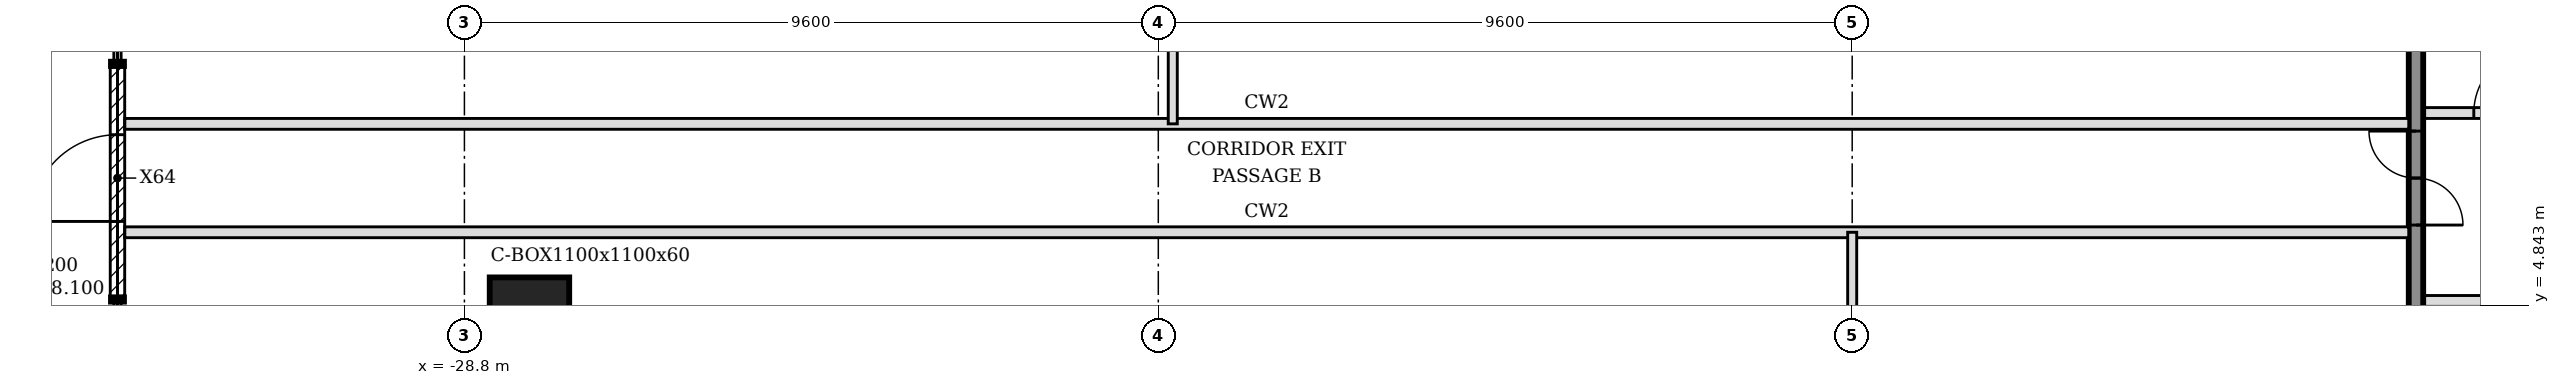
"""IFC4 building model, lengths in metres.
Left out: names, types, materials, properties, quantities, classifications, styles, units other than length and angle.
Written with IfcOpenShell. Run it as: python <this file> out.ifc"""

import sys

from ifc_helpers import new_model, si_unit, direction, frame, frame_2d, origin, origin_2d, place, context, subcontext, project, spatial, polyline, rectangle, hollow_rectangle, outline, extrude, element, fill, save


model = new_model("IFC4")
c1 = context("Model", 3, precision=1e-05, world=origin(), true_north=direction((0.0, 1.0)))
c2 = subcontext(c1, "Body", "Model", "MODEL_VIEW")
j1 = project(units=[si_unit("LENGTHUNIT", "METRE"), si_unit("PLANEANGLEUNIT", "RADIAN")], contexts=[c1])
p1 = place(None, origin())
s1 = spatial("IfcSite", under=j1, at=p1, CompositionType="ELEMENT")
p2 = place(p1, origin())
s2 = spatial("IfcBuilding", under=s1, at=p2, CompositionType="ELEMENT")
p3 = place(p2, origin())
s3 = spatial("IfcBuildingStorey", under=s2, at=p3, CompositionType="ELEMENT", Elevation=0.0)
p4 = place(p3, frame((-27.9, 4.676, -0.25), z_axis=(0.0, 0.0, 1.0), x_axis=(1.0, 0.0, 0.0)))
e1 = element("IfcColumn", 1, at=p4, inside=s3, PredefinedType="COLUMN", context=c2, shape_type="SweptSolid", body=[
    extrude(hollow_rectangle(XDim=1.1, YDim=1.1, WallThickness=0.06, at=origin_2d()), origin(), (0.0, 0.0, 1.0), 9.05),
])
p5 = place(p3, frame((-33.6, 4.95, 0.0), z_axis=(0.0, 0.0, 1.0), x_axis=(0.0, 1.0, 0.0)))
e2 = element("IfcWall", 2, at=p5, inside=s3, PredefinedType="SOLIDWALL", context=c2, shape_type="SweptSolid", body=[
    extrude(rectangle(XDim=3.2, YDim=0.2, at=frame_2d((1.6, 0.0))), origin(), (0.0, 0.0, 1.0), 8.1),
])
p6 = place(p5, frame((1.05, 0.0, 0.0)))
e3 = element("IfcOpeningElement", 3, at=p6, cuts=e2, PredefinedType="OPENING", context=c2, shape_type="SweptSolid", body=[
    extrude(rectangle(XDim=1.2, YDim=2.1, at=frame_2d((0.6, 1.05))), frame((0.0, 0.11, 0.0), z_axis=(0.0, -1.0, 0.0), x_axis=(1.0, 0.0, 0.0)), (0.0, 0.0, 1.0), 0.22),
])
p7 = place(p3, frame((-1.7, 4.9, 0.0), z_axis=(0.0, 0.0, 1.0), x_axis=(1.0, 0.0, 0.0)))
e4 = element("IfcWall", 4, at=p7, inside=s3, PredefinedType="SOLIDWALL", context=c2, shape_type="SweptSolid", body=[
    extrude(rectangle(XDim=4.9, YDim=0.15, at=frame_2d((2.45, 0.0))), origin(), (0.0, 0.0, 1.0), 8.8),
])
p8 = place(p7, frame((1.95, 0.0, 0.0)))
e5 = element("IfcOpeningElement", 5, at=p8, cuts=e4, PredefinedType="OPENING", context=c2, shape_type="SweptSolid", body=[
    extrude(rectangle(XDim=0.9, YDim=2.1, at=frame_2d((0.45, 1.05))), frame((0.0, 0.085, 0.0), z_axis=(0.0, -1.0, 0.0), x_axis=(1.0, 0.0, 0.0)), (0.0, 0.0, 1.0), 0.17),
])
p9 = place(p3, frame((-1.7, 7.5, 0.0), z_axis=(0.0, 0.0, 1.0), x_axis=(1.0, 0.0, 0.0)))
e6 = element("IfcWall", 6, at=p9, inside=s3, PredefinedType="SOLIDWALL", context=c2, shape_type="SweptSolid", body=[
    extrude(rectangle(XDim=4.825, YDim=0.15, at=frame_2d((2.413, 0.0))), origin(), (0.0, 0.0, 1.0), 8.8),
])
p10 = place(p9, frame((0.7, 0.0, 0.0)))
e7 = element("IfcOpeningElement", 7, at=p10, cuts=e6, PredefinedType="OPENING", context=c2, shape_type="SweptSolid", body=[
    extrude(rectangle(XDim=0.9, YDim=2.1, at=frame_2d((0.45, 1.05))), frame((0.0, 0.085, 0.0), z_axis=(0.0, -1.0, 0.0), x_axis=(1.0, 0.0, 0.0)), (0.0, 0.0, 1.0), 0.17),
])
p11 = place(p9, frame((3.2, 0.0, 0.0)))
e8 = element("IfcOpeningElement", 8, at=p11, cuts=e6, PredefinedType="OPENING", context=c2, shape_type="SweptSolid", body=[
    extrude(rectangle(XDim=0.9, YDim=2.1, at=frame_2d((0.45, 1.05))), frame((0.0, 0.085, 0.0), z_axis=(0.0, -1.0, 0.0), x_axis=(1.0, 0.0, 0.0)), (0.0, 0.0, 1.0), 0.17),
])
p12 = place(p3, frame((-1.8, -5.5, 0.0), z_axis=(0.0, 0.0, 1.0), x_axis=(0.0, 1.0, 0.0)))
e9 = element("IfcWall", 9, at=p12, inside=s3, PredefinedType="SOLIDWALL", context=c2, shape_type="SweptSolid", body=[
    extrude(rectangle(XDim=15.8, YDim=0.2, at=frame_2d((7.9, 0.0))), origin(), (0.0, 0.0, 1.0), 8.8),
])
p13 = place(p12, frame((3.05, 0.0, 0.0)))
e10 = element("IfcOpeningElement", 10, at=p13, cuts=e9, PredefinedType="OPENING", context=c2, shape_type="SweptSolid", body=[
    extrude(rectangle(XDim=1.3, YDim=2.1, at=frame_2d((0.65, 1.05))), frame((0.0, 0.11, 0.0), z_axis=(0.0, -1.0, 0.0), x_axis=(1.0, 0.0, 0.0)), (0.0, 0.0, 1.0), 0.22),
])
p14 = place(p12, frame((11.45, 0.0, 0.0)))
e11 = element("IfcOpeningElement", 11, at=p14, cuts=e9, PredefinedType="OPENING", context=c2, shape_type="SweptSolid", body=[
    extrude(rectangle(XDim=1.3, YDim=2.1, at=frame_2d((0.65, 1.05))), frame((0.0, 0.11, 0.0), z_axis=(0.0, -1.0, 0.0), x_axis=(1.0, 0.0, 0.0)), (0.0, 0.0, 1.0), 0.22),
])
for number, where, z_axis, x_axis in (
    (12, (-33.5, 5.85, 0.0), (0.0, 0.0, 1.0), (1.0, 0.0, 0.0)),
    (13, (-33.5, 7.35, 0.0), (0.0, 0.0, 1.0), (1.0, 0.0, 0.0)),
):
    element("IfcWall", number, at=place(p3, frame(where, z_axis=z_axis, x_axis=x_axis)), inside=s3, PredefinedType="SOLIDWALL", context=c2, shape_type="SweptSolid", body=[
        extrude(rectangle(XDim=31.6, YDim=0.15, at=frame_2d((15.8, 0.0))), origin(), (0.0, 0.0, 1.0), 8.8),
    ])
p15 = place(p3, frame((-9.6, -8.938, 0.0), z_axis=(0.0, 0.0, 1.0), x_axis=(0.0, 1.0, 0.0)))
e14 = element("IfcWall", 14, at=p15, inside=s3, PredefinedType="PARTITIONING", context=c2, shape_type="SweptSolid", body=[
    extrude(outline(polyline([(0.0, 0.0), (14.788, 0.0), (14.788, 8.28), (9.087, 8.28), (9.085, 8.18), (8.788, 8.18), (8.785, 8.28), (0.0, 8.28), (0.0, 0.0)])), frame((0.0, 0.062, 0.0), z_axis=(0.0, -1.0, 0.0), x_axis=(1.0, 0.0, 0.0)), (0.0, 0.0, 1.0), 0.125),
])
p16 = place(p15, frame((5.538, 0.0, 0.0)))
e15 = element("IfcOpeningElement", 15, at=p16, cuts=e14, PredefinedType="OPENING", context=c2, shape_type="SweptSolid", body=[
    extrude(rectangle(XDim=1.8, YDim=2.1, at=frame_2d((0.9, 1.05))), frame((0.0, 0.073, 0.0), z_axis=(0.0, -1.0, 0.0), x_axis=(1.0, 0.0, 0.0)), (0.0, 0.0, 1.0), 0.145),
])
p17 = place(p3, frame((-19.0, 7.35, 0.0), z_axis=(0.0, 0.0, 1.0), x_axis=(0.0, 1.0, 0.0)))
e16 = element("IfcWall", 16, at=p17, inside=s3, PredefinedType="PARTITIONING", context=c2, shape_type="SweptSolid", body=[
    extrude(outline(polyline([(0.0, 0.0), (15.2, 0.0), (15.2, 8.8), (2.4, 8.8), (2.398, 7.98), (2.1, 7.98), (2.098, 8.8), (0.0, 8.8), (0.0, 0.0)])), frame((0.0, 0.062, 0.0), z_axis=(0.0, -1.0, 0.0), x_axis=(1.0, 0.0, 0.0)), (0.0, 0.0, 1.0), 0.125),
])
p18 = place(p17, frame((4.2, 0.0, 0.0)))
e17 = element("IfcOpeningElement", 17, at=p18, cuts=e16, PredefinedType="OPENING", context=c2, shape_type="SweptSolid", body=[
    extrude(rectangle(XDim=0.9, YDim=2.1, at=frame_2d((0.45, 1.05))), frame((0.0, 0.073, 0.0), z_axis=(0.0, -1.0, 0.0), x_axis=(1.0, 0.0, 0.0)), (0.0, 0.0, 1.0), 0.145),
])
p19 = place(p17, frame((11.2, 0.0, 0.0)))
e18 = element("IfcOpeningElement", 18, at=p19, cuts=e16, PredefinedType="OPENING", context=c2, shape_type="SweptSolid", body=[
    extrude(rectangle(XDim=0.9, YDim=2.1, at=frame_2d((0.45, 1.05))), frame((0.0, 0.073, 0.0), z_axis=(0.0, -1.0, 0.0), x_axis=(1.0, 0.0, 0.0)), (0.0, 0.0, 1.0), 0.145),
])
p20 = place(p6, origin())
e19 = element("IfcDoor", 19, at=p20, inside=s3, OperationType="SINGLE_SWING_LEFT", PredefinedType="DOOR", context=c2, shape_type="SweptSolid", body=[
    extrude(rectangle(XDim=1.2, YDim=2.1, at=frame_2d((0.6, 1.05))), frame((0.0, 0.025, 0.0), z_axis=(0.0, -1.0, 0.0), x_axis=(1.0, 0.0, 0.0)), (0.0, 0.0, 1.0), 0.05),
])
fill(e3, e19)
p21 = place(p14, origin())
e20 = element("IfcDoor", 20, at=p21, inside=s3, OperationType="DOUBLE_DOOR_SINGLE_SWING", PredefinedType="DOOR", context=c2, shape_type="SweptSolid", body=[
    extrude(rectangle(XDim=1.3, YDim=2.1, at=frame_2d((0.65, 1.05))), frame((0.0, 0.025, 0.0), z_axis=(0.0, -1.0, 0.0), x_axis=(1.0, 0.0, 0.0)), (0.0, 0.0, 1.0), 0.05),
])
fill(e11, e20)
p22 = place(p10, origin())
e21 = element("IfcDoor", 21, at=p22, inside=s3, OperationType="SINGLE_SWING_RIGHT", PredefinedType="DOOR", context=c2, shape_type="SweptSolid", body=[
    extrude(rectangle(XDim=0.9, YDim=2.1, at=frame_2d((0.45, 1.05))), frame((0.0, 0.025, 0.0), z_axis=(0.0, -1.0, 0.0), x_axis=(1.0, 0.0, 0.0)), (0.0, 0.0, 1.0), 0.05),
])
fill(e7, e21)
save(model, sys.argv[1])
